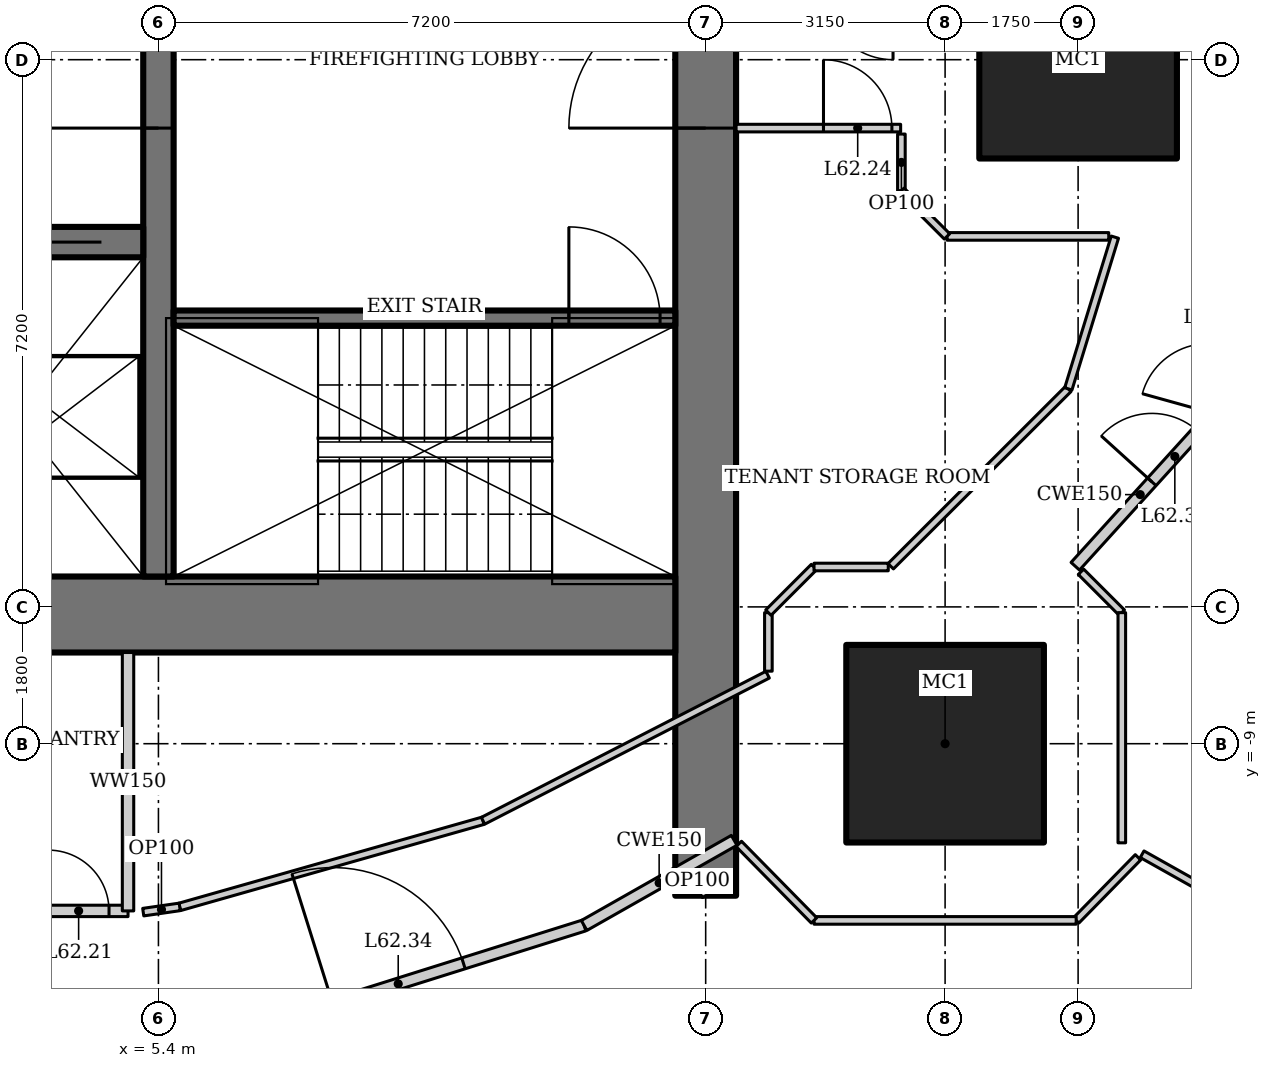
"""IFC4 building model, lengths in metres.
Left out: names, types, materials, properties, quantities, classifications, styles, units other than length and angle.
Written with IfcOpenShell. Run it as: python <this file> out.ifc"""

import sys

from ifc_helpers import new_model, si_unit, direction, frame, frame_2d, origin, origin_2d, place, context, subcontext, project, spatial, rectangle, hollow_rectangle, extrude, element, fill, save


model = new_model("IFC4")
c1 = context("Model", 3, precision=1e-05, world=origin(), true_north=direction((0.0, 1.0)))
c2 = subcontext(c1, "Body", "Model", "MODEL_VIEW")
j1 = project(units=[si_unit("LENGTHUNIT", "METRE"), si_unit("PLANEANGLEUNIT", "RADIAN")], contexts=[c1])
p1 = place(None, origin())
s1 = spatial("IfcSite", under=j1, at=p1, CompositionType="ELEMENT")
p2 = place(p1, origin())
s2 = spatial("IfcBuilding", under=s1, at=p2, CompositionType="ELEMENT")
p3 = place(p2, frame((0.0, 0.0, 266.2)))
s3 = spatial("IfcBuildingStorey", under=s2, at=p3, CompositionType="ELEMENT", Elevation=266.2)
for number, where, z_axis, x_axis in (
    (1, (17.5, 0.0, 0.0), (0.0, 0.0, 1.0), (1.0, 0.0, 0.0)),
    (2, (15.75, -9.0, 0.0), (0.0, 0.0, 1.0), (1.0, 0.0, 0.0)),
):
    element("IfcColumn", number, at=place(p3, frame(where, z_axis=z_axis, x_axis=x_axis)), inside=s3, PredefinedType="COLUMN", context=c2, shape_type="SweptSolid", body=[
        extrude(hollow_rectangle(XDim=2.6, YDim=2.6, WallThickness=0.13, at=origin_2d()), origin(), (0.0, 0.0, 1.0), 4.2),
    ])
p4 = place(p3, frame((20.423, -11.67, 0.0), z_axis=(-0.310472199469, 0.177420864126, 0.933878391617), x_axis=(-0.496156180016, -0.868233289521, 0.0)))
e3 = element("IfcColumn", 3, at=p4, inside=s3, PredefinedType="COLUMN", context=c2, shape_type="SweptSolid", body=[
    extrude(hollow_rectangle(XDim=1.2, YDim=1.2, WallThickness=0.1, at=origin_2d()), origin(), (0.0, 0.0, 1.0), 4.264),
])
p5 = place(p3, frame((12.6, -11.0, 0.0), z_axis=(0.0, 0.0, 1.0), x_axis=(0.0, 1.0, 0.0)))
e4 = element("IfcWall", 4, at=p5, inside=s3, PredefinedType="SHEAR", context=c2, shape_type="SweptSolid", body=[
    extrude(rectangle(XDim=22.0, YDim=0.8, at=frame_2d((11.0, 0.0))), origin(), (0.0, 0.0, 1.0), 4.2),
])
p6 = place(p5, frame((10.1, 0.0, 0.0)))
e5 = element("IfcOpeningElement", 5, at=p6, cuts=e4, PredefinedType="OPENING", context=c2, shape_type="SweptSolid", body=[
    extrude(rectangle(XDim=1.8, YDim=2.1, at=frame_2d((0.9, 1.05))), frame((0.0, 0.41, 0.0), z_axis=(0.0, -1.0, 0.0), x_axis=(1.0, 0.0, 0.0)), (0.0, 0.0, 1.0), 0.82),
])
p7 = place(p3, frame((-12.2, -7.3, 0.0), z_axis=(0.0, 0.0, 1.0), x_axis=(1.0, 0.0, 0.0)))
e6 = element("IfcWall", 6, at=p7, inside=s3, PredefinedType="SHEAR", context=c2, shape_type="SweptSolid", body=[
    extrude(rectangle(XDim=24.4, YDim=1.0, at=frame_2d((12.2, 0.0))), origin(), (0.0, 0.0, 1.0), 4.2),
])
p8 = place(p3, frame((5.4, -6.8, 0.0), z_axis=(0.0, 0.0, 1.0), x_axis=(0.0, 1.0, 0.0)))
e7 = element("IfcWall", 7, at=p8, inside=s3, PredefinedType="SHEAR", context=c2, shape_type="SweptSolid", body=[
    extrude(rectangle(XDim=14.6, YDim=0.4, at=frame_2d((7.3, 0.0))), origin(), (0.0, 0.0, 1.0), 4.2),
])
p9 = place(p8, frame((5.9, 0.0, 0.0)))
e8 = element("IfcOpeningElement", 8, at=p9, cuts=e7, PredefinedType="OPENING", context=c2, shape_type="SweptSolid", body=[
    extrude(rectangle(XDim=1.8, YDim=2.1, at=frame_2d((0.9, 1.05))), frame((0.0, 0.21, 0.0), z_axis=(0.0, -1.0, 0.0), x_axis=(1.0, 0.0, 0.0)), (0.0, 0.0, 1.0), 0.42),
])
p10 = place(p3, frame((-5.2, -2.4, 0.0), z_axis=(0.0, 0.0, 1.0), x_axis=(1.0, 0.0, 0.0)))
e9 = element("IfcWall", 9, at=p10, inside=s3, PredefinedType="SHEAR", context=c2, shape_type="SweptSolid", body=[
    extrude(rectangle(XDim=10.4, YDim=0.4, at=frame_2d((5.2, 0.0))), origin(), (0.0, 0.0, 1.0), 4.2),
])
p11 = place(p10, frame((1.683, 0.0, 0.0)))
e10 = element("IfcOpeningElement", 10, at=p11, cuts=e9, PredefinedType="OPENING", context=c2, shape_type="SweptSolid", body=[
    extrude(rectangle(XDim=1.1, YDim=2.2, at=frame_2d((0.55, 1.1))), frame((0.0, 0.21, 0.0), z_axis=(0.0, -1.0, 0.0), x_axis=(1.0, 0.0, 0.0)), (0.0, 0.0, 1.0), 0.42),
])
p12 = place(p10, frame((5.217, 0.0, 0.0)))
e11 = element("IfcOpeningElement", 11, at=p12, cuts=e9, PredefinedType="OPENING", context=c2, shape_type="SweptSolid", body=[
    extrude(rectangle(XDim=1.1, YDim=2.2, at=frame_2d((0.55, 1.1))), frame((0.0, 0.21, 0.0), z_axis=(0.0, -1.0, 0.0), x_axis=(1.0, 0.0, 0.0)), (0.0, 0.0, 1.0), 0.42),
])
p13 = place(p10, frame((8.75, 0.0, 0.0)))
e12 = element("IfcOpeningElement", 12, at=p13, cuts=e9, PredefinedType="OPENING", context=c2, shape_type="SweptSolid", body=[
    extrude(rectangle(XDim=1.1, YDim=2.2, at=frame_2d((0.55, 1.1))), frame((0.0, 0.21, 0.0), z_axis=(0.0, -1.0, 0.0), x_axis=(1.0, 0.0, 0.0)), (0.0, 0.0, 1.0), 0.42),
])
p14 = place(p3, frame((5.6, -3.4, 0.0), z_axis=(0.0, 0.0, 1.0), x_axis=(1.0, 0.0, 0.0)))
e13 = element("IfcWall", 13, at=p14, inside=s3, PredefinedType="SHEAR", context=c2, shape_type="SweptSolid", body=[
    extrude(rectangle(XDim=6.6, YDim=0.2, at=frame_2d((3.3, 0.0))), origin(), (0.0, 0.0, 1.0), 4.2),
])
p15 = place(p14, frame((5.2, 0.0, 0.0)))
e14 = element("IfcOpeningElement", 14, at=p15, cuts=e13, PredefinedType="OPENING", context=c2, shape_type="SweptSolid", body=[
    extrude(rectangle(XDim=1.2, YDim=2.1, at=frame_2d((0.6, 1.05))), frame((0.0, 0.11, 0.0), z_axis=(0.0, -1.0, 0.0), x_axis=(1.0, 0.0, 0.0)), (0.0, 0.0, 1.0), 0.22),
])
p16 = place(p3, frame((6.521, -12.799, 0.0), z_axis=(0.0, 0.0, 1.0), x_axis=(0.954031103669, 0.299707612903, 0.0)))
e15 = element("IfcWall", 15, at=p16, inside=s3, PredefinedType="PARTITIONING", context=c2, shape_type="SweptSolid", body=[
    extrude(rectangle(XDim=4.695, YDim=0.15, at=frame_2d((2.348, 0.0))), origin(), (0.0, 0.0, 1.0), 4.05),
])
p17 = place(p16, frame((1.231, 0.0, 0.0)))
e16 = element("IfcOpeningElement", 16, at=p17, cuts=e15, PredefinedType="OPENING", context=c2, shape_type="SweptSolid", body=[
    extrude(rectangle(XDim=1.8, YDim=2.1, at=frame_2d((0.9, 1.05))), frame((0.0, 0.085, 0.0), z_axis=(0.0, -1.0, 0.0), x_axis=(1.0, 0.0, 0.0)), (0.0, 0.0, 1.0), 0.17),
])
p18 = place(p3, frame((-5.0, -11.2, 0.0), z_axis=(0.0, 0.0, 1.0), x_axis=(1.0, 0.0, 0.0)))
e17 = element("IfcWall", 17, at=p18, inside=s3, PredefinedType="SOLIDWALL", context=c2, shape_type="SweptSolid", body=[
    extrude(rectangle(XDim=10.0, YDim=0.15, at=frame_2d((5.0, 0.0))), origin(), (0.0, 0.0, 1.0), 4.05),
])
p19 = place(p18, frame((0.45, 0.0, 0.0)))
e18 = element("IfcOpeningElement", 18, at=p19, cuts=e17, PredefinedType="OPENING", context=c2, shape_type="SweptSolid", body=[
    extrude(rectangle(XDim=1.0, YDim=2.1, at=frame_2d((0.5, 1.05))), frame((0.0, 0.085, 0.0), z_axis=(0.0, -1.0, 0.0), x_axis=(1.0, 0.0, 0.0)), (0.0, 0.0, 1.0), 0.17),
])
p20 = place(p18, frame((3.15, 0.0, 0.0)))
e19 = element("IfcOpeningElement", 19, at=p20, cuts=e17, PredefinedType="OPENING", context=c2, shape_type="SweptSolid", body=[
    extrude(rectangle(XDim=0.9, YDim=2.1, at=frame_2d((0.45, 1.05))), frame((0.0, 0.085, 0.0), z_axis=(0.0, -1.0, 0.0), x_axis=(1.0, 0.0, 0.0)), (0.0, 0.0, 1.0), 0.17),
])
p21 = place(p18, frame((6.55, 0.0, 0.0)))
e20 = element("IfcOpeningElement", 20, at=p21, cuts=e17, PredefinedType="OPENING", context=c2, shape_type="SweptSolid", body=[
    extrude(rectangle(XDim=0.9, YDim=2.1, at=frame_2d((0.45, 1.05))), frame((0.0, 0.085, 0.0), z_axis=(0.0, -1.0, 0.0), x_axis=(1.0, 0.0, 0.0)), (0.0, 0.0, 1.0), 0.17),
])
p22 = place(p18, frame((8.95, 0.0, 0.0)))
e21 = element("IfcOpeningElement", 21, at=p22, cuts=e17, PredefinedType="OPENING", context=c2, shape_type="SweptSolid", body=[
    extrude(rectangle(XDim=0.8, YDim=2.1, at=frame_2d((0.4, 1.05))), frame((0.0, 0.085, 0.0), z_axis=(0.0, -1.0, 0.0), x_axis=(1.0, 0.0, 0.0)), (0.0, 0.0, 1.0), 0.17),
])
p23 = place(p3, frame((5.0, -7.8, 0.0), z_axis=(0.0, 0.0, 1.0), x_axis=(0.0, -1.0, 0.0)))
e22 = element("IfcWall", 22, at=p23, inside=s3, PredefinedType="SOLIDWALL", context=c2, shape_type="SweptSolid", body=[
    extrude(rectangle(XDim=3.4, YDim=0.15, at=frame_2d((1.7, 0.0))), origin(), (0.0, 0.0, 1.0), 4.05),
])
p24 = place(p3, frame((9.67, -10.014, 0.0), z_axis=(0.0, 0.0, 1.0), x_axis=(-0.961973498971, -0.273142796496, 0.0)))
e23 = element("IfcWall", 23, at=p24, inside=s3, PredefinedType="PARTITIONING", context=c2, shape_type="SweptSolid", body=[
    extrude(rectangle(XDim=4.148, YDim=0.1, at=frame_2d((2.074, 0.0))), origin(), (0.0, 0.0, 1.0), 4.05),
])
p25 = place(p3, frame((5.68, -11.147, 0.0), z_axis=(0.0, 0.0, 1.0), x_axis=(-0.989797891768, -0.142478536811, 0.0)))
e24 = element("IfcWall", 24, at=p25, inside=s3, PredefinedType="PARTITIONING", context=c2, shape_type="SweptSolid", body=[
    extrude(rectangle(XDim=0.485, YDim=0.1, at=frame_2d((0.242, 0.0))), origin(), (0.0, 0.0, 1.0), 4.05),
])
p26 = place(p3, frame((12.6, -11.0, 0.0), z_axis=(0.0, 0.0, 1.0), x_axis=(-0.493794495037, 0.869578631678, 0.0)))
e25 = element("IfcWall", 25, at=p26, inside=s3, PredefinedType="PARTITIONING", context=c2, shape_type="SweptSolid", body=[
    extrude(rectangle(XDim=0.449, YDim=0.1, at=frame_2d((0.225, 0.0))), origin(), (0.0, 0.0, 1.0), 4.05),
])
p27 = place(p3, frame((21.358, -12.15, 0.0), z_axis=(0.0, 0.0, 1.0), x_axis=(-0.871730019583, 0.489986502832, 0.0)))
e26 = element("IfcWall", 26, at=p27, inside=s3, PredefinedType="PARTITIONING", context=c2, shape_type="SweptSolid", body=[
    extrude(rectangle(XDim=3.46, YDim=0.1, at=frame_2d((1.73, 0.0))), origin(), (0.0, 0.0, 1.0), 3.601),
])
p28 = place(p3, frame((11.001, -11.392, 0.0), z_axis=(0.0, 0.0, 1.0), x_axis=(0.869722107117, 0.493541747366, 0.0)))
e27 = element("IfcWall", 27, at=p28, inside=s3, PredefinedType="PARTITIONING", context=c2, shape_type="SweptSolid", body=[
    extrude(rectangle(XDim=2.27, YDim=0.15, at=frame_2d((1.135, 0.0))), origin(), (0.0, 0.0, 1.0), 4.05),
])
p29 = place(p3, frame((17.463, -6.665, 0.0), z_axis=(0.0, 0.0, 1.0), x_axis=(0.671721890643, 0.74080341632, 0.0)))
e28 = element("IfcWall", 28, at=p29, inside=s3, PredefinedType="PARTITIONING", context=c2, shape_type="SweptSolid", body=[
    extrude(rectangle(XDim=2.544, YDim=0.15, at=frame_2d((1.272, 0.0))), origin(), (0.0, 0.0, 1.0), 4.05),
])
p30 = place(p29, frame((1.5, 0.0, 0.0)))
e29 = element("IfcOpeningElement", 29, at=p30, cuts=e28, PredefinedType="OPENING", context=c2, shape_type="SweptSolid", body=[
    extrude(rectangle(XDim=0.9, YDim=2.1, at=frame_2d((0.45, 1.05))), frame((0.0, 0.085, 0.0), z_axis=(0.0, -1.0, 0.0), x_axis=(1.0, 0.0, 0.0)), (0.0, 0.0, 1.0), 0.17),
])
p31 = place(p3, frame((17.372, -4.331, 0.0), z_axis=(0.0, 0.0, 1.0), x_axis=(-0.707587114823, -0.70662612104, 0.0)))
e30 = element("IfcWall", 30, at=p31, inside=s3, PredefinedType="PARTITIONING", context=c2, shape_type="SweptSolid", body=[
    extrude(rectangle(XDim=3.303, YDim=0.1, at=frame_2d((1.651, 0.0))), origin(), (0.0, 0.0, 1.0), 4.05),
])
p32 = place(p3, frame((13.415, -8.092, 0.0), z_axis=(0.0, 0.0, 1.0), x_axis=(-0.889620520549, -0.45670048108, 0.0)))
e31 = element("IfcWall", 31, at=p32, inside=s3, PredefinedType="PARTITIONING", context=c2, shape_type="SweptSolid", body=[
    extrude(rectangle(XDim=4.209, YDim=0.1, at=frame_2d((2.104, 0.0))), origin(), (0.0, 0.0, 1.0), 4.05),
])
p33 = place(p3, frame((13.425, -8.046, 0.0), z_axis=(0.0, 0.0, 1.0), x_axis=(0.0, 1.0, 0.0)))
e32 = element("IfcWall", 32, at=p33, inside=s3, PredefinedType="PARTITIONING", context=c2, shape_type="SweptSolid", body=[
    extrude(rectangle(XDim=0.77, YDim=0.1, at=frame_2d((0.385, 0.0))), origin(), (0.0, 0.0, 1.0), 4.05),
])
p34 = place(p3, frame((13.425, -7.275, 0.0), z_axis=(0.0, 0.0, 1.0), x_axis=(0.707106781187, 0.707106781187, 0.0)))
e33 = element("IfcWall", 33, at=p34, inside=s3, PredefinedType="PARTITIONING", context=c2, shape_type="SweptSolid", body=[
    extrude(rectangle(XDim=0.849, YDim=0.1, at=frame_2d((0.425, 0.0))), origin(), (0.0, 0.0, 1.0), 4.05),
])
p35 = place(p3, frame((14.025, -6.675, 0.0), z_axis=(0.0, 0.0, 1.0), x_axis=(1.0, 0.0, 0.0)))
e34 = element("IfcWall", 34, at=p35, inside=s3, PredefinedType="PARTITIONING", context=c2, shape_type="SweptSolid", body=[
    extrude(rectangle(XDim=0.977, YDim=0.1, at=frame_2d((0.488, 0.0))), origin(), (0.0, 0.0, 1.0), 4.05),
])
p36 = place(p3, frame((18.288, -10.495, 0.0), z_axis=(0.0, 0.0, 1.0), x_axis=(-0.699823580681, -0.714315725659, 0.0)))
e35 = element("IfcWall", 35, at=p36, inside=s3, PredefinedType="PARTITIONING", context=c2, shape_type="SweptSolid", body=[
    extrude(rectangle(XDim=1.162, YDim=0.1, at=frame_2d((0.581, 0.0))), origin(), (0.0, 0.0, 1.0), 4.05),
])
p37 = place(p3, frame((17.475, -11.325, 0.0), z_axis=(0.0, 0.0, 1.0), x_axis=(-1.0, 0.0, 0.0)))
e36 = element("IfcWall", 36, at=p37, inside=s3, PredefinedType="PARTITIONING", context=c2, shape_type="SweptSolid", body=[
    extrude(rectangle(XDim=3.449, YDim=0.1, at=frame_2d((1.725, 0.0))), origin(), (0.0, 0.0, 1.0), 4.05),
])
p38 = place(p3, frame((14.025, -11.325, 0.0), z_axis=(0.0, 0.0, 1.0), x_axis=(-0.701113567316, 0.713049623606, 0.0)))
e37 = element("IfcWall", 37, at=p38, inside=s3, PredefinedType="PARTITIONING", context=c2, shape_type="SweptSolid", body=[
    extrude(rectangle(XDim=1.411, YDim=0.1, at=frame_2d((0.706, 0.0))), origin(), (0.0, 0.0, 1.0), 4.05),
])
p39 = place(p3, frame((17.538, -6.738, 0.0), z_axis=(0.0, 0.0, 1.0), x_axis=(0.707106781187, -0.707106781187, 0.0)))
e38 = element("IfcWall", 38, at=p39, inside=s3, PredefinedType="PARTITIONING", context=c2, shape_type="SweptSolid", body=[
    extrude(rectangle(XDim=0.76, YDim=0.1, at=frame_2d((0.38, 0.0))), origin(), (0.0, 0.0, 1.0), 4.05),
])
p40 = place(p3, frame((18.075, -7.275, 0.0), z_axis=(0.0, 0.0, 1.0), x_axis=(0.0, -1.0, 0.0)))
e39 = element("IfcWall", 39, at=p40, inside=s3, PredefinedType="PARTITIONING", context=c2, shape_type="SweptSolid", body=[
    extrude(rectangle(XDim=3.029, YDim=0.1, at=frame_2d((1.514, 0.0))), origin(), (0.0, 0.0, 1.0), 3.522),
])
p41 = place(p3, frame((13.0, -0.9, 0.0), z_axis=(0.0, 0.0, 1.0), x_axis=(1.0, 0.0, 0.0)))
e40 = element("IfcWall", 40, at=p41, inside=s3, PredefinedType="PARTITIONING", context=c2, shape_type="SweptSolid", body=[
    extrude(rectangle(XDim=2.165, YDim=0.1, at=frame_2d((1.083, 0.0))), origin(), (0.0, 0.0, 1.0), 4.05),
])
p42 = place(p41, frame((1.15, 0.0, 0.0)))
e41 = element("IfcOpeningElement", 41, at=p42, cuts=e40, PredefinedType="OPENING", context=c2, shape_type="SweptSolid", body=[
    extrude(rectangle(XDim=0.9, YDim=2.1, at=frame_2d((0.45, 1.05))), frame((0.0, 0.06, 0.0), z_axis=(0.0, -1.0, 0.0), x_axis=(1.0, 0.0, 0.0)), (0.0, 0.0, 1.0), 0.12),
])
p43 = place(p3, frame((17.984, -2.335, 0.0), z_axis=(0.0, 0.0, 1.0), x_axis=(-0.293231279211, -0.956041535129, 0.0)))
e42 = element("IfcWall", 42, at=p43, inside=s3, PredefinedType="PARTITIONING", context=c2, shape_type="SweptSolid", body=[
    extrude(rectangle(XDim=2.088, YDim=0.1, at=frame_2d((1.044, 0.0))), origin(), (0.0, 0.0, 1.0), 4.05),
])
p44 = place(p3, frame((15.175, -1.725, 0.0), z_axis=(0.0, 0.0, 1.0), x_axis=(0.0, 1.0, 0.0)))
e43 = element("IfcWall", 43, at=p44, inside=s3, PredefinedType="PARTITIONING", context=c2, shape_type="SweptSolid", body=[
    extrude(rectangle(XDim=0.746, YDim=0.1, at=frame_2d((0.373, 0.0))), origin(), (0.0, 0.0, 1.0), 4.05),
])
p45 = place(p3, frame((17.903, -2.325, 0.0), z_axis=(0.0, 0.0, 1.0), x_axis=(-1.0, 0.0, 0.0)))
e44 = element("IfcWall", 44, at=p45, inside=s3, PredefinedType="PARTITIONING", context=c2, shape_type="SweptSolid", body=[
    extrude(rectangle(XDim=2.128, YDim=0.1, at=frame_2d((1.064, 0.0))), origin(), (0.0, 0.0, 1.0), 4.05),
])
p46 = place(p3, frame((15.775, -2.325, 0.0), z_axis=(0.0, 0.0, 1.0), x_axis=(-0.707106781187, 0.707106781187, 0.0)))
e45 = element("IfcWall", 45, at=p46, inside=s3, PredefinedType="PARTITIONING", context=c2, shape_type="SweptSolid", body=[
    extrude(rectangle(XDim=0.849, YDim=0.1, at=frame_2d((0.425, 0.0))), origin(), (0.0, 0.0, 1.0), 4.05),
])
p47 = place(p9, origin())
e46 = element("IfcDoor", 46, at=p47, inside=s3, OperationType="DOUBLE_DOOR_DOUBLE_SWING", PredefinedType="DOOR", context=c2, shape_type="SweptSolid", body=[
    extrude(rectangle(XDim=1.8, YDim=2.1, at=frame_2d((0.9, 1.05))), frame((0.0, 0.025, 0.0), z_axis=(0.0, -1.0, 0.0), x_axis=(1.0, 0.0, 0.0)), (0.0, 0.0, 1.0), 0.05),
])
fill(e8, e46)
p48 = place(p15, origin())
e47 = element("IfcDoor", 47, at=p48, inside=s3, OperationType="SINGLE_SWING_RIGHT", PredefinedType="DOOR", context=c2, shape_type="SweptSolid", body=[
    extrude(rectangle(XDim=1.2, YDim=2.1, at=frame_2d((0.6, 1.05))), frame((0.0, 0.025, 0.0), z_axis=(0.0, -1.0, 0.0), x_axis=(1.0, 0.0, 0.0)), (0.0, 0.0, 1.0), 0.05),
])
fill(e14, e47)
p49 = place(p6, origin())
e48 = element("IfcDoor", 48, at=p49, inside=s3, OperationType="DOUBLE_DOOR_DOUBLE_SWING", PredefinedType="DOOR", context=c2, shape_type="SweptSolid", body=[
    extrude(rectangle(XDim=1.8, YDim=2.1, at=frame_2d((0.9, 1.05))), frame((0.0, 0.025, 0.0), z_axis=(0.0, -1.0, 0.0), x_axis=(1.0, 0.0, 0.0)), (0.0, 0.0, 1.0), 0.05),
])
fill(e5, e48)
p50 = place(p13, origin())
e49 = element("IfcDoor", 49, at=p50, inside=s3, OperationType="DOUBLE_DOOR_SLIDING", PredefinedType="DOOR", context=c2, shape_type="SweptSolid", body=[
    extrude(rectangle(XDim=1.1, YDim=2.2, at=frame_2d((0.55, 1.1))), frame((0.0, 0.025, 0.0), z_axis=(0.0, -1.0, 0.0), x_axis=(1.0, 0.0, 0.0)), (0.0, 0.0, 1.0), 0.05),
])
fill(e12, e49)
p51 = place(p22, origin())
e50 = element("IfcDoor", 50, at=p51, inside=s3, OperationType="SINGLE_SWING_LEFT", PredefinedType="DOOR", context=c2, shape_type="SweptSolid", body=[
    extrude(rectangle(XDim=0.8, YDim=2.1, at=frame_2d((0.4, 1.05))), frame((0.0, 0.025, 0.0), z_axis=(0.0, -1.0, 0.0), x_axis=(1.0, 0.0, 0.0)), (0.0, 0.0, 1.0), 0.05),
])
fill(e21, e50)
p52 = place(p42, origin())
e51 = element("IfcDoor", 51, at=p52, inside=s3, OperationType="SINGLE_SWING_LEFT", PredefinedType="DOOR", context=c2, shape_type="SweptSolid", body=[
    extrude(rectangle(XDim=0.9, YDim=2.1, at=frame_2d((0.45, 1.05))), frame((0.0, 0.025, 0.0), z_axis=(0.0, -1.0, 0.0), x_axis=(1.0, 0.0, 0.0)), (0.0, 0.0, 1.0), 0.05),
])
fill(e41, e51)
p53 = place(p17, origin())
e52 = element("IfcDoor", 52, at=p53, inside=s3, OperationType="DOUBLE_DOOR_DOUBLE_SWING", PredefinedType="DOOR", context=c2, shape_type="SweptSolid", body=[
    extrude(rectangle(XDim=1.8, YDim=2.1, at=frame_2d((0.9, 1.05))), frame((0.0, 0.025, 0.0), z_axis=(0.0, -1.0, 0.0), x_axis=(1.0, 0.0, 0.0)), (0.0, 0.0, 1.0), 0.05),
])
fill(e16, e52)
p54 = place(p30, origin())
e53 = element("IfcDoor", 53, at=p54, inside=s3, OperationType="SINGLE_SWING_LEFT", PredefinedType="DOOR", context=c2, shape_type="SweptSolid", body=[
    extrude(rectangle(XDim=0.9, YDim=2.1, at=frame_2d((0.45, 1.05))), frame((0.0, 0.025, 0.0), z_axis=(0.0, -1.0, 0.0), x_axis=(1.0, 0.0, 0.0)), (0.0, 0.0, 1.0), 0.05),
])
fill(e29, e53)
save(model, sys.argv[1])
